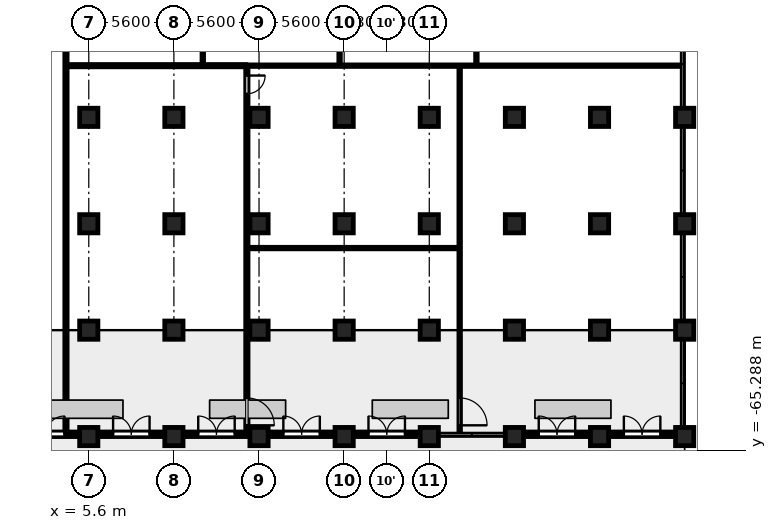
"""IFC4 building model, lengths in metres.
Left out: names, types, materials, properties, quantities, classifications, styles, units other than length and angle.
Written with IfcOpenShell. Run it as: python <this file> out.ifc"""

import sys

from ifc_helpers import new_model, si_unit, direction, frame, frame_2d, origin, origin_2d, place, context, subcontext, project, spatial, rectangle, circle, extrude, element, fill, save


model = new_model("IFC4")
c1 = context("Model", 3, precision=1e-05, world=origin(), true_north=direction((0.0, 1.0)))
c2 = subcontext(c1, "Body", "Model", "MODEL_VIEW")
j1 = project(units=[si_unit("LENGTHUNIT", "METRE"), si_unit("PLANEANGLEUNIT", "RADIAN")], contexts=[c1])
p1 = place(None, origin())
s1 = spatial("IfcSite", under=j1, at=p1, CompositionType="ELEMENT")
p2 = place(p1, origin())
s2 = spatial("IfcBuilding", under=s1, at=p2, CompositionType="ELEMENT")
p3 = place(p2, origin())
s3 = spatial("IfcBuildingStorey", under=s2, at=p3, CompositionType="ELEMENT", Elevation=0.0)
for number, where, z_axis, x_axis in (
    (1, (5.6, -43.4, 0.0), (0.0, 0.0, 1.0), (1.0, 0.0, 0.0)),
    (2, (11.2, -43.4, 0.0), (0.0, 0.0, 1.0), (1.0, 0.0, 0.0)),
    (3, (16.8, -43.4, 0.0), (0.0, 0.0, 1.0), (1.0, 0.0, 0.0)),
    (4, (22.4, -43.4, 0.0), (0.0, 0.0, 1.0), (1.0, 0.0, 0.0)),
    (5, (28.0, -43.4, 0.0), (0.0, 0.0, 1.0), (1.0, 0.0, 0.0)),
    (6, (33.6, -43.4, 0.0), (0.0, 0.0, 1.0), (1.0, 0.0, 0.0)),
    (7, (39.2, -43.4, 0.0), (0.0, 0.0, 1.0), (1.0, 0.0, 0.0)),
    (8, (44.8, -43.4, 0.0), (0.0, 0.0, 1.0), (1.0, 0.0, 0.0)),
    (9, (5.6, -50.4, 0.0), (0.0, 0.0, 1.0), (1.0, 0.0, 0.0)),
    (10, (11.2, -50.4, 0.0), (0.0, 0.0, 1.0), (1.0, 0.0, 0.0)),
    (11, (16.8, -50.4, 0.0), (0.0, 0.0, 1.0), (1.0, 0.0, 0.0)),
    (12, (22.4, -50.4, 0.0), (0.0, 0.0, 1.0), (1.0, 0.0, 0.0)),
    (13, (28.0, -50.4, 0.0), (0.0, 0.0, 1.0), (1.0, 0.0, 0.0)),
    (14, (33.6, -50.4, 0.0), (0.0, 0.0, 1.0), (1.0, 0.0, 0.0)),
    (15, (39.2, -50.4, 0.0), (0.0, 0.0, 1.0), (1.0, 0.0, 0.0)),
    (16, (44.8, -50.4, 0.0), (0.0, 0.0, 1.0), (1.0, 0.0, 0.0)),
    (17, (5.6, -57.4, 0.0), (0.0, 0.0, 1.0), (1.0, 0.0, 0.0)),
    (18, (11.2, -57.4, 0.0), (0.0, 0.0, 1.0), (1.0, 0.0, 0.0)),
    (19, (16.8, -57.4, 0.0), (0.0, 0.0, 1.0), (1.0, 0.0, 0.0)),
    (20, (22.4, -57.4, 0.0), (0.0, 0.0, 1.0), (1.0, 0.0, 0.0)),
    (21, (28.0, -57.4, 0.0), (0.0, 0.0, 1.0), (1.0, 0.0, 0.0)),
    (22, (33.6, -57.4, 0.0), (0.0, 0.0, 1.0), (1.0, 0.0, 0.0)),
    (23, (39.2, -57.4, 0.0), (0.0, 0.0, 1.0), (1.0, 0.0, 0.0)),
    (24, (44.8, -57.4, 0.0), (0.0, 0.0, 1.0), (1.0, 0.0, 0.0)),
    (25, (5.6, -64.4, 0.0), (0.0, 0.0, 1.0), (1.0, 0.0, 0.0)),
    (26, (11.2, -64.4, 0.0), (0.0, 0.0, 1.0), (1.0, 0.0, 0.0)),
    (27, (16.8, -64.4, 0.0), (0.0, 0.0, 1.0), (1.0, 0.0, 0.0)),
    (28, (22.4, -64.4, 0.0), (0.0, 0.0, 1.0), (1.0, 0.0, 0.0)),
    (29, (28.0, -64.4, 0.0), (0.0, 0.0, 1.0), (1.0, 0.0, 0.0)),
    (30, (33.6, -64.4, 0.0), (0.0, 0.0, 1.0), (1.0, 0.0, 0.0)),
    (31, (39.2, -64.4, 0.0), (0.0, 0.0, 1.0), (1.0, 0.0, 0.0)),
    (32, (44.8, -64.4, 0.0), (0.0, 0.0, 1.0), (1.0, 0.0, 0.0)),
):
    element("IfcColumn", number, at=place(p3, frame(where, z_axis=z_axis, x_axis=x_axis)), inside=s3, PredefinedType="COLUMN", context=c2, shape_type="SweptSolid", body=[
        extrude(circle(Radius=0.6, at=origin_2d()), origin(), (0.0, 0.0, 1.0), 6.5),
    ])
p4 = place(p3, frame((0.6, -64.25, 0.0), z_axis=(0.0, 0.0, 1.0), x_axis=(1.0, 0.0, 0.0)))
e33 = element("IfcWall", 33, at=p4, inside=s3, PredefinedType="SOLIDWALL", context=c2, shape_type="SweptSolid", body=[
    extrude(rectangle(XDim=4.4, YDim=0.3, at=frame_2d((2.2, 0.0))), origin(), (0.0, 0.0, 1.0), 5.35),
])
p5 = place(p4, frame((1.0, 0.0, 0.0)))
e34 = element("IfcOpeningElement", 34, at=p5, cuts=e33, PredefinedType="OPENING", context=c2, shape_type="SweptSolid", body=[
    extrude(rectangle(XDim=2.4, YDim=2.4, at=frame_2d((1.2, 1.2))), frame((0.0, 0.16, 0.0), z_axis=(0.0, -1.0, 0.0), x_axis=(1.0, 0.0, 0.0)), (0.0, 0.0, 1.0), 0.32),
])
p6 = place(p3, frame((6.2, -64.25, 0.0), z_axis=(0.0, 0.0, 1.0), x_axis=(1.0, 0.0, 0.0)))
e35 = element("IfcWall", 35, at=p6, inside=s3, PredefinedType="SOLIDWALL", context=c2, shape_type="SweptSolid", body=[
    extrude(rectangle(XDim=4.4, YDim=0.3, at=frame_2d((2.2, 0.0))), origin(), (0.0, 0.0, 1.0), 5.35),
])
p7 = place(p6, frame((1.0, 0.0, 0.0)))
e36 = element("IfcOpeningElement", 36, at=p7, cuts=e35, PredefinedType="OPENING", context=c2, shape_type="SweptSolid", body=[
    extrude(rectangle(XDim=2.4, YDim=2.4, at=frame_2d((1.2, 1.2))), frame((0.0, 0.16, 0.0), z_axis=(0.0, -1.0, 0.0), x_axis=(1.0, 0.0, 0.0)), (0.0, 0.0, 1.0), 0.32),
])
p8 = place(p3, frame((11.8, -64.25, 0.0), z_axis=(0.0, 0.0, 1.0), x_axis=(1.0, 0.0, 0.0)))
e37 = element("IfcWall", 37, at=p8, inside=s3, PredefinedType="SOLIDWALL", context=c2, shape_type="SweptSolid", body=[
    extrude(rectangle(XDim=4.4, YDim=0.3, at=frame_2d((2.2, 0.0))), origin(), (0.0, 0.0, 1.0), 5.35),
])
p9 = place(p8, frame((1.0, 0.0, 0.0)))
e38 = element("IfcOpeningElement", 38, at=p9, cuts=e37, PredefinedType="OPENING", context=c2, shape_type="SweptSolid", body=[
    extrude(rectangle(XDim=2.4, YDim=2.4, at=frame_2d((1.2, 1.2))), frame((0.0, 0.16, 0.0), z_axis=(0.0, -1.0, 0.0), x_axis=(1.0, 0.0, 0.0)), (0.0, 0.0, 1.0), 0.32),
])
p10 = place(p3, frame((17.4, -64.25, 0.0), z_axis=(0.0, 0.0, 1.0), x_axis=(1.0, 0.0, 0.0)))
e39 = element("IfcWall", 39, at=p10, inside=s3, PredefinedType="SOLIDWALL", context=c2, shape_type="SweptSolid", body=[
    extrude(rectangle(XDim=4.4, YDim=0.3, at=frame_2d((2.2, 0.0))), origin(), (0.0, 0.0, 1.0), 5.35),
])
p11 = place(p10, frame((1.0, 0.0, 0.0)))
e40 = element("IfcOpeningElement", 40, at=p11, cuts=e39, PredefinedType="OPENING", context=c2, shape_type="SweptSolid", body=[
    extrude(rectangle(XDim=2.4, YDim=2.4, at=frame_2d((1.2, 1.2))), frame((0.0, 0.16, 0.0), z_axis=(0.0, -1.0, 0.0), x_axis=(1.0, 0.0, 0.0)), (0.0, 0.0, 1.0), 0.32),
])
p12 = place(p3, frame((23.0, -64.25, 0.0), z_axis=(0.0, 0.0, 1.0), x_axis=(1.0, 0.0, 0.0)))
e41 = element("IfcWall", 41, at=p12, inside=s3, PredefinedType="SOLIDWALL", context=c2, shape_type="SweptSolid", body=[
    extrude(rectangle(XDim=4.4, YDim=0.3, at=frame_2d((2.2, 0.0))), origin(), (0.0, 0.0, 1.0), 5.35),
])
p13 = place(p12, frame((1.0, 0.0, 0.0)))
e42 = element("IfcOpeningElement", 42, at=p13, cuts=e41, PredefinedType="OPENING", context=c2, shape_type="SweptSolid", body=[
    extrude(rectangle(XDim=2.4, YDim=2.4, at=frame_2d((1.2, 1.2))), frame((0.0, 0.16, 0.0), z_axis=(0.0, -1.0, 0.0), x_axis=(1.0, 0.0, 0.0)), (0.0, 0.0, 1.0), 0.32),
])
p14 = place(p3, frame((34.2, -64.25, 0.0), z_axis=(0.0, 0.0, 1.0), x_axis=(1.0, 0.0, 0.0)))
e43 = element("IfcWall", 43, at=p14, inside=s3, PredefinedType="SOLIDWALL", context=c2, shape_type="SweptSolid", body=[
    extrude(rectangle(XDim=4.4, YDim=0.3, at=frame_2d((2.2, 0.0))), origin(), (0.0, 0.0, 1.0), 5.35),
])
p15 = place(p14, frame((1.0, 0.0, 0.0)))
e44 = element("IfcOpeningElement", 44, at=p15, cuts=e43, PredefinedType="OPENING", context=c2, shape_type="SweptSolid", body=[
    extrude(rectangle(XDim=2.4, YDim=2.4, at=frame_2d((1.2, 1.2))), frame((0.0, 0.16, 0.0), z_axis=(0.0, -1.0, 0.0), x_axis=(1.0, 0.0, 0.0)), (0.0, 0.0, 1.0), 0.32),
])
p16 = place(p3, frame((39.8, -64.25, 0.0), z_axis=(0.0, 0.0, 1.0), x_axis=(1.0, 0.0, 0.0)))
e45 = element("IfcWall", 45, at=p16, inside=s3, PredefinedType="SOLIDWALL", context=c2, shape_type="SweptSolid", body=[
    extrude(rectangle(XDim=4.4, YDim=0.3, at=frame_2d((2.2, 0.0))), origin(), (0.0, 0.0, 1.0), 5.35),
])
p17 = place(p16, frame((1.0, 0.0, 0.0)))
e46 = element("IfcOpeningElement", 46, at=p17, cuts=e45, PredefinedType="OPENING", context=c2, shape_type="SweptSolid", body=[
    extrude(rectangle(XDim=2.4, YDim=2.4, at=frame_2d((1.2, 1.2))), frame((0.0, 0.16, 0.0), z_axis=(0.0, -1.0, 0.0), x_axis=(1.0, 0.0, 0.0)), (0.0, 0.0, 1.0), 0.32),
])
p18 = place(p3, frame((16.075, -52.0, 0.0), z_axis=(0.0, 0.0, 1.0), x_axis=(1.0, 0.0, 0.0)))
e47 = element("IfcWall", 47, at=p18, inside=s3, PredefinedType="PARTITIONING", context=c2, shape_type="SweptSolid", body=[
    extrude(rectangle(XDim=13.875, YDim=0.1, at=frame_2d((6.938, 0.0))), origin(), (0.0, 0.0, 1.0), 6.15),
])
p19 = place(p3, frame((16.0, -40.0, 0.0), z_axis=(0.0, 0.0, 1.0), x_axis=(1.0, 0.0, 0.0)))
e48 = element("IfcWall", 48, at=p19, inside=s3, PredefinedType="PARTITIONING", context=c2, shape_type="SweptSolid", body=[
    extrude(rectangle(XDim=28.618, YDim=0.1, at=frame_2d((14.309, 0.0))), origin(), (0.0, 0.0, 1.0), 6.15),
])
p20 = place(p3, frame((4.175, -40.0, 0.0), z_axis=(0.0, 0.0, 1.0), x_axis=(1.0, 0.0, 0.0)))
e49 = element("IfcWall", 49, at=p20, inside=s3, PredefinedType="PARTITIONING", context=c2, shape_type="SweptSolid", body=[
    extrude(rectangle(XDim=11.825, YDim=0.15, at=frame_2d((5.913, 0.0))), origin(), (0.0, 0.0, 1.0), 6.15),
])
p21 = place(p3, frame((4.1, -64.08, 0.0), z_axis=(0.0, 0.0, 1.0), x_axis=(0.0, 1.0, 0.0)))
e50 = element("IfcWall", 50, at=p21, inside=s3, PredefinedType="PARTITIONING", context=c2, shape_type="SweptSolid", body=[
    extrude(rectangle(XDim=39.205, YDim=0.15, at=frame_2d((19.603, 0.0))), origin(), (0.0, 0.0, 1.0), 6.15),
])
p22 = place(p3, frame((13.1, -39.925, 0.0), z_axis=(0.0, 0.0, 1.0), x_axis=(0.0, 1.0, 0.0)))
e51 = element("IfcWall", 51, at=p22, inside=s3, PredefinedType="PARTITIONING", context=c2, shape_type="SweptSolid", body=[
    extrude(rectangle(XDim=15.05, YDim=0.1, at=frame_2d((7.525, 0.0))), origin(), (0.0, 0.0, 1.0), 6.15),
])
p23 = place(p3, frame((16.0, -64.08, 0.0), z_axis=(0.0, 0.0, 1.0), x_axis=(0.0, 1.0, 0.0)))
e52 = element("IfcWall", 52, at=p23, inside=s3, PredefinedType="PARTITIONING", context=c2, shape_type="SweptSolid", body=[
    extrude(rectangle(XDim=24.03, YDim=0.15, at=frame_2d((12.015, 0.0))), origin(), (0.0, 0.0, 1.0), 6.15),
])
p24 = place(p23, frame((0.42, 0.0, 0.0)))
e53 = element("IfcOpeningElement", 53, at=p24, cuts=e52, PredefinedType="OPENING", context=c2, shape_type="SweptSolid", body=[
    extrude(rectangle(XDim=1.8, YDim=2.1, at=frame_2d((0.9, 1.05))), frame((0.0, 0.085, 0.0), z_axis=(0.0, -1.0, 0.0), x_axis=(1.0, 0.0, 0.0)), (0.0, 0.0, 1.0), 0.17),
])
p25 = place(p23, frame((22.23, 0.0, 0.0)))
e54 = element("IfcOpeningElement", 54, at=p25, cuts=e52, PredefinedType="OPENING", context=c2, shape_type="SweptSolid", body=[
    extrude(rectangle(XDim=1.2, YDim=2.1, at=frame_2d((0.6, 1.05))), frame((0.0, 0.085, 0.0), z_axis=(0.0, -1.0, 0.0), x_axis=(1.0, 0.0, 0.0)), (0.0, 0.0, 1.0), 0.17),
])
p26 = place(p3, frame((22.1, -39.95, 0.0), z_axis=(0.0, 0.0, 1.0), x_axis=(0.0, 1.0, 0.0)))
e55 = element("IfcWall", 55, at=p26, inside=s3, PredefinedType="PARTITIONING", context=c2, shape_type="SweptSolid", body=[
    extrude(rectangle(XDim=15.075, YDim=0.1, at=frame_2d((7.538, 0.0))), origin(), (0.0, 0.0, 1.0), 6.15),
])
p27 = place(p3, frame((30.0, -64.218, 0.0), z_axis=(0.0, 0.0, 1.0), x_axis=(0.0, 1.0, 0.0)))
e56 = element("IfcWall", 56, at=p27, inside=s3, PredefinedType="PARTITIONING", context=c2, shape_type="SweptSolid", body=[
    extrude(rectangle(XDim=24.168, YDim=0.1, at=frame_2d((12.084, 0.0))), origin(), (0.0, 0.0, 1.0), 6.15),
])
p28 = place(p27, frame((0.558, 0.0, 0.0)))
e57 = element("IfcOpeningElement", 57, at=p28, cuts=e56, PredefinedType="OPENING", context=c2, shape_type="SweptSolid", body=[
    extrude(rectangle(XDim=1.8, YDim=2.1, at=frame_2d((0.9, 1.05))), frame((0.0, 0.06, 0.0), z_axis=(0.0, -1.0, 0.0), x_axis=(1.0, 0.0, 0.0)), (0.0, 0.0, 1.0), 0.12),
])
p29 = place(p3, frame((31.1, -39.95, 0.0), z_axis=(0.0, 0.0, 1.0), x_axis=(0.0, 1.0, 0.0)))
e58 = element("IfcWall", 58, at=p29, inside=s3, PredefinedType="PARTITIONING", context=c2, shape_type="SweptSolid", body=[
    extrude(rectangle(XDim=15.075, YDim=0.1, at=frame_2d((7.538, 0.0))), origin(), (0.0, 0.0, 1.0), 6.15),
])
p30 = place(p5, origin())
e59 = element("IfcDoor", 59, at=p30, inside=s3, OperationType="SINGLE_SWING_LEFT", PredefinedType="DOOR", context=c2, shape_type="SweptSolid", body=[
    extrude(rectangle(XDim=2.4, YDim=2.4, at=frame_2d((1.2, 1.2))), frame((0.0, 0.025, 0.0), z_axis=(0.0, -1.0, 0.0), x_axis=(1.0, 0.0, 0.0)), (0.0, 0.0, 1.0), 0.05),
])
fill(e34, e59)
p31 = place(p7, origin())
e60 = element("IfcDoor", 60, at=p31, inside=s3, OperationType="SINGLE_SWING_LEFT", PredefinedType="DOOR", context=c2, shape_type="SweptSolid", body=[
    extrude(rectangle(XDim=2.4, YDim=2.4, at=frame_2d((1.2, 1.2))), frame((0.0, 0.025, 0.0), z_axis=(0.0, -1.0, 0.0), x_axis=(1.0, 0.0, 0.0)), (0.0, 0.0, 1.0), 0.05),
])
fill(e36, e60)
p32 = place(p9, origin())
e61 = element("IfcDoor", 61, at=p32, inside=s3, OperationType="SINGLE_SWING_LEFT", PredefinedType="DOOR", context=c2, shape_type="SweptSolid", body=[
    extrude(rectangle(XDim=2.4, YDim=2.4, at=frame_2d((1.2, 1.2))), frame((0.0, 0.025, 0.0), z_axis=(0.0, -1.0, 0.0), x_axis=(1.0, 0.0, 0.0)), (0.0, 0.0, 1.0), 0.05),
])
fill(e38, e61)
p33 = place(p11, origin())
e62 = element("IfcDoor", 62, at=p33, inside=s3, OperationType="SINGLE_SWING_LEFT", PredefinedType="DOOR", context=c2, shape_type="SweptSolid", body=[
    extrude(rectangle(XDim=2.4, YDim=2.4, at=frame_2d((1.2, 1.2))), frame((0.0, 0.025, 0.0), z_axis=(0.0, -1.0, 0.0), x_axis=(1.0, 0.0, 0.0)), (0.0, 0.0, 1.0), 0.05),
])
fill(e40, e62)
p34 = place(p13, origin())
e63 = element("IfcDoor", 63, at=p34, inside=s3, OperationType="SINGLE_SWING_LEFT", PredefinedType="DOOR", context=c2, shape_type="SweptSolid", body=[
    extrude(rectangle(XDim=2.4, YDim=2.4, at=frame_2d((1.2, 1.2))), frame((0.0, 0.025, 0.0), z_axis=(0.0, -1.0, 0.0), x_axis=(1.0, 0.0, 0.0)), (0.0, 0.0, 1.0), 0.05),
])
fill(e42, e63)
p35 = place(p15, origin())
e64 = element("IfcDoor", 64, at=p35, inside=s3, OperationType="SINGLE_SWING_LEFT", PredefinedType="DOOR", context=c2, shape_type="SweptSolid", body=[
    extrude(rectangle(XDim=2.4, YDim=2.4, at=frame_2d((1.2, 1.2))), frame((0.0, 0.025, 0.0), z_axis=(0.0, -1.0, 0.0), x_axis=(1.0, 0.0, 0.0)), (0.0, 0.0, 1.0), 0.05),
])
fill(e44, e64)
p36 = place(p17, origin())
e65 = element("IfcDoor", 65, at=p36, inside=s3, OperationType="SINGLE_SWING_LEFT", PredefinedType="DOOR", context=c2, shape_type="SweptSolid", body=[
    extrude(rectangle(XDim=2.4, YDim=2.4, at=frame_2d((1.2, 1.2))), frame((0.0, 0.025, 0.0), z_axis=(0.0, -1.0, 0.0), x_axis=(1.0, 0.0, 0.0)), (0.0, 0.0, 1.0), 0.05),
])
fill(e46, e65)
p37 = place(p24, origin())
e66 = element("IfcDoor", 66, at=p37, inside=s3, OperationType="SINGLE_SWING_LEFT", PredefinedType="DOOR", context=c2, shape_type="SweptSolid", body=[
    extrude(rectangle(XDim=1.8, YDim=2.1, at=frame_2d((0.9, 1.05))), frame((0.0, 0.025, 0.0), z_axis=(0.0, -1.0, 0.0), x_axis=(1.0, 0.0, 0.0)), (0.0, 0.0, 1.0), 0.05),
])
fill(e53, e66)
p38 = place(p25, origin())
e67 = element("IfcDoor", 67, at=p38, inside=s3, OperationType="SINGLE_SWING_RIGHT", PredefinedType="DOOR", context=c2, shape_type="SweptSolid", body=[
    extrude(rectangle(XDim=1.2, YDim=2.1, at=frame_2d((0.6, 1.05))), frame((0.0, 0.025, 0.0), z_axis=(0.0, -1.0, 0.0), x_axis=(1.0, 0.0, 0.0)), (0.0, 0.0, 1.0), 0.05),
])
fill(e54, e67)
p39 = place(p28, origin())
e68 = element("IfcDoor", 68, at=p39, inside=s3, OperationType="SINGLE_SWING_LEFT", PredefinedType="DOOR", context=c2, shape_type="SweptSolid", body=[
    extrude(rectangle(XDim=1.8, YDim=2.1, at=frame_2d((0.9, 1.05))), frame((0.0, 0.025, 0.0), z_axis=(0.0, -1.0, 0.0), x_axis=(1.0, 0.0, 0.0)), (0.0, 0.0, 1.0), 0.05),
])
fill(e57, e68)
save(model, sys.argv[1])
